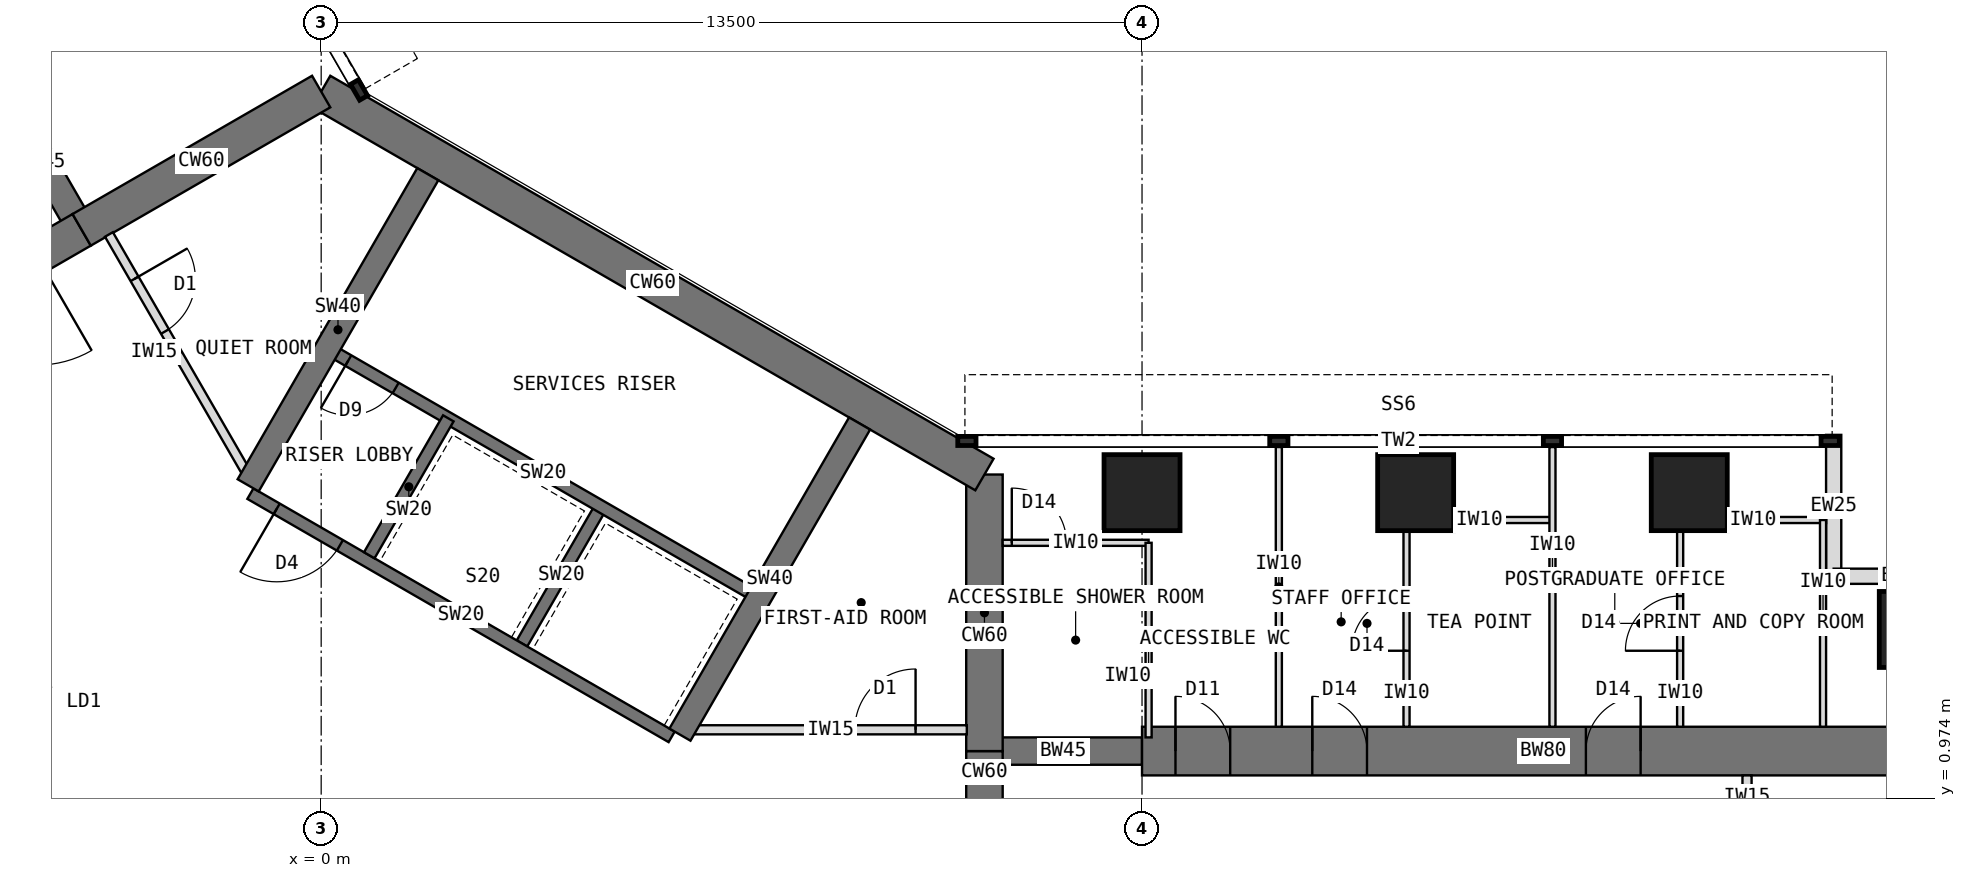
"""IFC4 building model, lengths in metres.
Left out: names, types, materials, properties, quantities, classifications, styles, units other than length and angle.
Written with IfcOpenShell. Run it as: python <this file> out.ifc"""

import sys

from ifc_helpers import new_model, si_unit, direction, frame, frame_2d, origin, origin_2d, place, context, subcontext, project, spatial, rectangle, extrude, element, fill, save


model = new_model("IFC4")
c1 = context("Model", 3, precision=1e-05, world=origin(), true_north=direction((0.0, 1.0)))
c2 = subcontext(c1, "Body", "Model", "MODEL_VIEW")
j1 = project(units=[si_unit("LENGTHUNIT", "METRE"), si_unit("PLANEANGLEUNIT", "RADIAN")], contexts=[c1])
p1 = place(None, origin())
s1 = spatial("IfcSite", under=j1, at=p1, CompositionType="ELEMENT")
p2 = place(p1, origin())
s2 = spatial("IfcBuilding", under=s1, at=p2, CompositionType="ELEMENT")
p3 = place(p2, frame((0.0, 0.0, 157.5)))
s3 = spatial("IfcBuildingStorey", under=s2, at=p3, CompositionType="ELEMENT", Elevation=157.5)
p4 = place(p3, frame((10.908, -1.75, 0.0), z_axis=(0.0, 0.0, 1.0), x_axis=(0.0, 1.0, 0.0)))
e1 = element("IfcWall", 1, at=p4, inside=s3, PredefinedType="SHEAR", context=c2, shape_type="SweptSolid", body=[
    extrude(rectangle(XDim=3.5, YDim=0.6, at=frame_2d((1.75, 0.0))), origin(), (0.0, 0.0, 1.0), 4.0),
])
p5 = place(p4, frame((0.85, 0.0, 0.0)))
e2 = element("IfcOpeningElement", 2, at=p5, cuts=e1, PredefinedType="OPENING", context=c2, shape_type="SweptSolid", body=[
    extrude(rectangle(XDim=1.8, YDim=2.1, at=frame_2d((0.9, 1.05))), frame((0.0, 0.31, 0.0), z_axis=(0.0, -1.0, 0.0), x_axis=(1.0, 0.0, 0.0)), (0.0, 0.0, 1.0), 0.62),
])
p6 = place(p3, frame((10.908, 1.75, 0.0), z_axis=(0.0, 0.0, 1.0), x_axis=(0.0, 1.0, 0.0)))
e3 = element("IfcWall", 3, at=p6, inside=s3, PredefinedType="SHEAR", context=c2, shape_type="SweptSolid", body=[
    extrude(rectangle(XDim=4.548, YDim=0.6, at=frame_2d((2.274, 0.0))), origin(), (0.0, 0.0, 1.0), 4.0),
])
p7 = place(p3, frame((10.908, 6.298, 0.0), z_axis=(0.0, 0.0, 1.0), x_axis=(-0.866021940709, 0.500005998175, 0.0)))
e4 = element("IfcWall", 4, at=p7, inside=s3, PredefinedType="SHEAR", context=c2, shape_type="SweptSolid", body=[
    extrude(rectangle(XDim=12.596, YDim=0.6, at=frame_2d((6.298, 0.0))), origin(), (0.0, 0.0, 1.0), 4.0),
])
p8 = place(p3, frame((0.0, 12.596, 0.0), z_axis=(0.0, 0.0, 1.0), x_axis=(-0.866011268655, -0.500024481964, 0.0)))
e5 = element("IfcWall", 5, at=p8, inside=s3, PredefinedType="SHEAR", context=c2, shape_type="SweptSolid", body=[
    extrude(rectangle(XDim=4.548, YDim=0.6, at=frame_2d((2.274, 0.0))), origin(), (0.0, 0.0, 1.0), 4.0),
])
p9 = place(p3, frame((-3.939, 10.322, 0.0), z_axis=(0.0, 0.0, 1.0), x_axis=(-0.866019471182, -0.500010275428, 0.0)))
e6 = element("IfcWall", 6, at=p9, inside=s3, PredefinedType="SHEAR", context=c2, shape_type="SweptSolid", body=[
    extrude(rectangle(XDim=3.5, YDim=0.6, at=frame_2d((1.75, 0.0))), origin(), (0.0, 0.0, 1.0), 4.0),
])
p10 = place(p9, frame((0.85, 0.0, 0.0)))
e7 = element("IfcOpeningElement", 7, at=p10, cuts=e6, PredefinedType="OPENING", context=c2, shape_type="SweptSolid", body=[
    extrude(rectangle(XDim=1.8, YDim=2.1, at=frame_2d((0.9, 1.05))), frame((0.0, 0.31, 0.0), z_axis=(0.0, -1.0, 0.0), x_axis=(1.0, 0.0, 0.0)), (0.0, 0.0, 1.0), 0.62),
])
p11 = place(p3, frame((10.908, 1.75, 0.0), z_axis=(0.0, 0.0, 1.0), x_axis=(1.0, 0.0, 0.0)))
e8 = element("IfcWall", 8, at=p11, inside=s3, PredefinedType="SHEAR", context=c2, shape_type="SweptSolid", body=[
    extrude(rectangle(XDim=2.592, YDim=0.45, at=frame_2d((1.296, 0.0))), origin(), (0.0, 0.0, 1.0), 4.0),
])
p12 = place(p3, frame((13.5, 1.75, 0.0), z_axis=(0.0, 0.0, 1.0), x_axis=(1.0, 0.0, 0.0)))
e9 = element("IfcWall", 9, at=p12, inside=s3, PredefinedType="SHEAR", context=c2, shape_type="SweptSolid", body=[
    extrude(rectangle(XDim=13.2, YDim=0.8, at=frame_2d((6.6, 0.0))), origin(), (0.0, 0.0, 1.0), 4.0),
])
p13 = place(p12, frame((0.55, 0.0, 0.0)))
e10 = element("IfcOpeningElement", 10, at=p13, cuts=e9, PredefinedType="OPENING", context=c2, shape_type="SweptSolid", body=[
    extrude(rectangle(XDim=0.9, YDim=2.1, at=frame_2d((0.45, 1.05))), frame((0.0, 0.41, 0.0), z_axis=(0.0, -1.0, 0.0), x_axis=(1.0, 0.0, 0.0)), (0.0, 0.0, 1.0), 0.82),
])
p14 = place(p12, frame((2.8, 0.0, 0.0)))
e11 = element("IfcOpeningElement", 11, at=p14, cuts=e9, PredefinedType="OPENING", context=c2, shape_type="SweptSolid", body=[
    extrude(rectangle(XDim=0.9, YDim=2.1, at=frame_2d((0.45, 1.05))), frame((0.0, 0.41, 0.0), z_axis=(0.0, -1.0, 0.0), x_axis=(1.0, 0.0, 0.0)), (0.0, 0.0, 1.0), 0.82),
])
p15 = place(p12, frame((7.3, 0.0, 0.0)))
e12 = element("IfcOpeningElement", 12, at=p15, cuts=e9, PredefinedType="OPENING", context=c2, shape_type="SweptSolid", body=[
    extrude(rectangle(XDim=0.9, YDim=2.1, at=frame_2d((0.45, 1.05))), frame((0.0, 0.41, 0.0), z_axis=(0.0, -1.0, 0.0), x_axis=(1.0, 0.0, 0.0)), (0.0, 0.0, 1.0), 0.82),
])
p16 = place(p3, frame((-3.939, 10.322, 0.0), z_axis=(0.0, 0.0, 1.0), x_axis=(-0.499918158782, 0.866072649678, 0.0)))
e13 = element("IfcWall", 13, at=p16, inside=s3, PredefinedType="SHEAR", context=c2, shape_type="SweptSolid", body=[
    extrude(rectangle(XDim=2.592, YDim=0.45, at=frame_2d((1.296, 0.0))), origin(), (0.0, 0.0, 1.0), 4.0),
])
for number, where, z_axis, x_axis in (
    (14, (13.5, 6.0, 0.0), (0.0, 0.0, 1.0), (1.0, 0.0, 0.0)),
    (15, (18.0, 6.0, 0.0), (0.0, 0.0, 1.0), (1.0, 0.0, 0.0)),
    (16, (22.5, 6.0, 0.0), (0.0, 0.0, 1.0), (1.0, 0.0, 0.0)),
    (17, (26.25, 3.75, 0.0), (0.0, 0.0, 1.0), (1.0, 0.0, 0.0)),
):
    element("IfcColumn", number, at=place(p3, frame(where, z_axis=z_axis, x_axis=x_axis)), inside=s3, PredefinedType="COLUMN", context=c2, shape_type="SweptSolid", body=[
        extrude(rectangle(XDim=1.25, YDim=1.25, at=origin_2d()), origin(), (0.0, 0.0, 1.0), 4.0),
    ])
for number, where, z_axis, x_axis in (
    (18, (24.875, 6.95, 0.0), (0.0, 0.0, 1.0), (0.0, -1.0, 0.0)),
    (19, (24.875, 4.625, 0.0), (0.0, 0.0, 1.0), (1.0, 0.0, 0.0)),
):
    element("IfcWall", number, at=place(p3, frame(where, z_axis=z_axis, x_axis=x_axis)), inside=s3, PredefinedType="STANDARD", context=c2, shape_type="SweptSolid", body=[
        extrude(rectangle(XDim=2.325, YDim=0.25, at=frame_2d((1.163, 0.0))), origin(), (0.0, 0.0, 1.0), 3.8),
    ])
p17 = place(p3, frame((5.764, 1.984, 0.0), z_axis=(0.0, 0.0, 1.0), x_axis=(-0.866026010844, 0.49999894854, 0.0)))
e20 = element("IfcWall", 20, at=p17, inside=s3, PredefinedType="SHEAR", context=c2, shape_type="SweptSolid", body=[
    extrude(rectangle(XDim=8.0, YDim=0.2, at=frame_2d((4.0, 0.0))), origin(), (0.0, 0.0, 1.0), 4.0),
])
p18 = place(p17, frame((6.3, 0.0, 0.0)))
e21 = element("IfcOpeningElement", 21, at=p18, cuts=e20, PredefinedType="OPENING", context=c2, shape_type="SweptSolid", body=[
    extrude(rectangle(XDim=1.2, YDim=2.1, at=frame_2d((0.6, 1.05))), frame((0.0, 0.11, 0.0), z_axis=(0.0, -1.0, 0.0), x_axis=(1.0, 0.0, 0.0)), (0.0, 0.0, 1.0), 0.22),
])
for number, where, z_axis, x_axis in (
    (22, (3.303, 3.52, 0.0), (0.0, 0.0, 1.0), (0.5, 0.866, 0.0)),
    (23, (0.791, 4.97, 0.0), (0.0, 0.0, 1.0), (0.5, 0.866, 0.0)),
):
    element("IfcWall", number, at=place(p3, frame(where, z_axis=z_axis, x_axis=x_axis)), inside=s3, PredefinedType="SHEAR", context=c2, shape_type="SweptSolid", body=[
        extrude(rectangle(XDim=2.6, YDim=0.2, at=frame_2d((1.3, 0.0))), origin(), (0.0, 0.0, 1.0), 4.0),
    ])
p19 = place(p3, frame((7.114, 4.322, 0.0), z_axis=(0.0, 0.0, 1.0), x_axis=(-0.866026010844, 0.49999894854, 0.0)))
e24 = element("IfcWall", 24, at=p19, inside=s3, PredefinedType="SHEAR", context=c2, shape_type="SweptSolid", body=[
    extrude(rectangle(XDim=8.0, YDim=0.2, at=frame_2d((4.0, 0.0))), origin(), (0.0, 0.0, 1.0), 4.0),
])
p20 = place(p19, frame((6.8, 0.0, 0.0)))
e25 = element("IfcOpeningElement", 25, at=p20, cuts=e24, PredefinedType="OPENING", context=c2, shape_type="SweptSolid", body=[
    extrude(rectangle(XDim=0.9, YDim=2.1, at=frame_2d((0.45, 1.05))), frame((0.0, 0.11, 0.0), z_axis=(0.0, -1.0, 0.0), x_axis=(1.0, 0.0, 0.0)), (0.0, 0.0, 1.0), 0.22),
])
p21 = place(p3, frame((-1.201, 6.12, 0.0), z_axis=(0.0, 0.0, 1.0), x_axis=(0.49999668571, 0.866027317282, 0.0)))
e26 = element("IfcWall", 26, at=p21, inside=s3, PredefinedType="SHEAR", context=c2, shape_type="SweptSolid", body=[
    extrude(rectangle(XDim=5.908, YDim=0.4, at=frame_2d((2.954, 0.0))), origin(), (0.0, 0.0, 1.0), 4.0),
])
p22 = place(p3, frame((5.901, 2.02, 0.0), z_axis=(0.0, 0.0, 1.0), x_axis=(0.500027676417, 0.866009424208, 0.0)))
e27 = element("IfcWall", 27, at=p22, inside=s3, PredefinedType="SHEAR", context=c2, shape_type="SweptSolid", body=[
    extrude(rectangle(XDim=5.908, YDim=0.4, at=frame_2d((2.954, 0.0))), origin(), (0.0, 0.0, 1.0), 4.0),
])
for number, where, z_axis, x_axis in (
    (28, (15.75, 2.15, 0.0), (0.0, 0.0, 1.0), (0.0, 1.0, 0.0)),
    (29, (20.25, 2.15, 0.0), (0.0, 0.0, 1.0), (0.0, 1.0, 0.0)),
):
    element("IfcWall", number, at=place(p3, frame(where, z_axis=z_axis, x_axis=x_axis)), inside=s3, PredefinedType="PARTITIONING", context=c2, shape_type="SweptSolid", body=[
        extrude(rectangle(XDim=4.6, YDim=0.1, at=frame_2d((2.3, 0.0))), origin(), (0.0, 0.0, 1.0), 3.8),
    ])
p23 = place(p3, frame((17.85, 5.55, 0.0), z_axis=(0.0, 0.0, 1.0), x_axis=(1.0, 0.0, 0.0)))
e30 = element("IfcWall", 30, at=p23, inside=s3, PredefinedType="PARTITIONING", context=c2, shape_type="SweptSolid", body=[
    extrude(rectangle(XDim=2.4, YDim=0.1, at=frame_2d((1.2, 0.0))), origin(), (0.0, 0.0, 1.0), 3.8),
])
p24 = place(p3, frame((17.85, 2.15, 0.0), z_axis=(0.0, 0.0, 1.0), x_axis=(0.0, 1.0, 0.0)))
e31 = element("IfcWall", 31, at=p24, inside=s3, PredefinedType="PARTITIONING", context=c2, shape_type="SweptSolid", body=[
    extrude(rectangle(XDim=3.4, YDim=0.1, at=frame_2d((1.7, 0.0))), origin(), (0.0, 0.0, 1.0), 3.8),
])
p25 = place(p24, frame((1.25, 0.0, 0.0)))
e32 = element("IfcOpeningElement", 32, at=p25, cuts=e31, PredefinedType="OPENING", context=c2, shape_type="SweptSolid", body=[
    extrude(rectangle(XDim=0.9, YDim=2.1, at=frame_2d((0.45, 1.05))), frame((0.0, 0.06, 0.0), z_axis=(0.0, -1.0, 0.0), x_axis=(1.0, 0.0, 0.0)), (0.0, 0.0, 1.0), 0.12),
])
p26 = place(p3, frame((22.35, 5.55, 0.0), z_axis=(0.0, 0.0, 1.0), x_axis=(1.0, 0.0, 0.0)))
e33 = element("IfcWall", 33, at=p26, inside=s3, PredefinedType="PARTITIONING", context=c2, shape_type="SweptSolid", body=[
    extrude(rectangle(XDim=2.4, YDim=0.1, at=frame_2d((1.2, 0.0))), origin(), (0.0, 0.0, 1.0), 3.8),
])
p27 = place(p3, frame((22.35, 2.15, 0.0), z_axis=(0.0, 0.0, 1.0), x_axis=(0.0, 1.0, 0.0)))
e34 = element("IfcWall", 34, at=p27, inside=s3, PredefinedType="PARTITIONING", context=c2, shape_type="SweptSolid", body=[
    extrude(rectangle(XDim=3.4, YDim=0.1, at=frame_2d((1.7, 0.0))), origin(), (0.0, 0.0, 1.0), 3.8),
])
p28 = place(p27, frame((1.25, 0.0, 0.0)))
e35 = element("IfcOpeningElement", 35, at=p28, cuts=e34, PredefinedType="OPENING", context=c2, shape_type="SweptSolid", body=[
    extrude(rectangle(XDim=0.9, YDim=2.1, at=frame_2d((0.45, 1.05))), frame((0.0, 0.06, 0.0), z_axis=(0.0, -1.0, 0.0), x_axis=(1.0, 0.0, 0.0)), (0.0, 0.0, 1.0), 0.12),
])
p29 = place(p3, frame((24.7, 2.15, 0.0), z_axis=(0.0, 0.0, 1.0), x_axis=(0.0, 1.0, 0.0)))
e36 = element("IfcWall", 36, at=p29, inside=s3, PredefinedType="PARTITIONING", context=c2, shape_type="SweptSolid", body=[
    extrude(rectangle(XDim=3.4, YDim=0.1, at=frame_2d((1.7, 0.0))), origin(), (0.0, 0.0, 1.0), 3.8),
])
p30 = place(p3, frame((11.208, 5.175, 0.0), z_axis=(0.0, 0.0, 1.0), x_axis=(1.0, 0.0, 0.0)))
e37 = element("IfcWall", 37, at=p30, inside=s3, PredefinedType="PARTITIONING", context=c2, shape_type="SweptSolid", body=[
    extrude(rectangle(XDim=2.4, YDim=0.1, at=frame_2d((1.2, 0.0))), origin(), (0.0, 0.0, 1.0), 3.8),
])
p31 = place(p30, frame((0.15, 0.0, 0.0)))
e38 = element("IfcOpeningElement", 38, at=p31, cuts=e37, PredefinedType="OPENING", context=c2, shape_type="SweptSolid", body=[
    extrude(rectangle(XDim=0.9, YDim=2.1, at=frame_2d((0.45, 1.05))), frame((0.0, 0.06, 0.0), z_axis=(0.0, -1.0, 0.0), x_axis=(1.0, 0.0, 0.0)), (0.0, 0.0, 1.0), 0.12),
])
p32 = place(p3, frame((13.608, 1.975, 0.0), z_axis=(0.0, 0.0, 1.0), x_axis=(0.0, 1.0, 0.0)))
e39 = element("IfcWall", 39, at=p32, inside=s3, PredefinedType="PARTITIONING", context=c2, shape_type="SweptSolid", body=[
    extrude(rectangle(XDim=3.2, YDim=0.1, at=frame_2d((1.6, 0.0))), origin(), (0.0, 0.0, 1.0), 3.8),
])
p33 = place(p3, frame((-3.49, 10.246, 0.0), z_axis=(0.0, 0.0, 1.0), x_axis=(0.499999473313, -0.866025707867, 0.0)))
e40 = element("IfcWall", 40, at=p33, inside=s3, PredefinedType="PARTITIONING", context=c2, shape_type="SweptSolid", body=[
    extrude(rectangle(XDim=4.476, YDim=0.15, at=frame_2d((2.238, 0.0))), origin(), (0.0, 0.0, 1.0), 3.8),
])
p34 = place(p33, frame((0.843, 0.0, 0.0)))
e41 = element("IfcOpeningElement", 41, at=p34, cuts=e40, PredefinedType="OPENING", context=c2, shape_type="SweptSolid", body=[
    extrude(rectangle(XDim=1.0, YDim=2.1, at=frame_2d((0.5, 1.05))), frame((0.0, 0.085, 0.0), z_axis=(0.0, -1.0, 0.0), x_axis=(1.0, 0.0, 0.0)), (0.0, 0.0, 1.0), 0.17),
])
p35 = place(p3, frame((6.143, 2.1, 0.0), z_axis=(0.0, 0.0, 1.0), x_axis=(1.0, 0.0, 0.0)))
e42 = element("IfcWall", 42, at=p35, inside=s3, PredefinedType="PARTITIONING", context=c2, shape_type="SweptSolid", body=[
    extrude(rectangle(XDim=4.476, YDim=0.15, at=frame_2d((2.238, 0.0))), origin(), (0.0, 0.0, 1.0), 3.8),
])
p36 = place(p35, frame((2.633, 0.0, 0.0)))
e43 = element("IfcOpeningElement", 43, at=p36, cuts=e42, PredefinedType="OPENING", context=c2, shape_type="SweptSolid", body=[
    extrude(rectangle(XDim=1.0, YDim=2.1, at=frame_2d((0.5, 1.05))), frame((0.0, 0.085, 0.0), z_axis=(0.0, -1.0, 0.0), x_axis=(1.0, 0.0, 0.0)), (0.0, 0.0, 1.0), 0.17),
])
p37 = place(p3, frame((23.45, -1.35, 0.0), z_axis=(0.0, 0.0, 1.0), x_axis=(0.0, 1.0, 0.0)))
e44 = element("IfcWall", 44, at=p37, inside=s3, PredefinedType="PARTITIONING", context=c2, shape_type="SweptSolid", body=[
    extrude(rectangle(XDim=2.7, YDim=0.15, at=frame_2d((1.35, 0.0))), origin(), (0.0, 0.0, 1.0), 3.8),
])
p38 = place(p37, frame((0.85, 0.0, 0.0)))
e45 = element("IfcOpeningElement", 45, at=p38, cuts=e44, PredefinedType="OPENING", context=c2, shape_type="SweptSolid", body=[
    extrude(rectangle(XDim=1.0, YDim=2.1, at=frame_2d((0.5, 1.05))), frame((0.0, 0.085, 0.0), z_axis=(0.0, -1.0, 0.0), x_axis=(1.0, 0.0, 0.0)), (0.0, 0.0, 1.0), 0.17),
])
p39 = place(p18, origin())
e46 = element("IfcDoor", 46, at=p39, inside=s3, OperationType="SINGLE_SWING_RIGHT", PredefinedType="DOOR", context=c2, shape_type="SweptSolid", body=[
    extrude(rectangle(XDim=1.2, YDim=2.1, at=frame_2d((0.6, 1.05))), frame((0.0, 0.025, 0.0), z_axis=(0.0, -1.0, 0.0), x_axis=(1.0, 0.0, 0.0)), (0.0, 0.0, 1.0), 0.05),
])
fill(e21, e46)
p40 = place(p20, origin())
e47 = element("IfcDoor", 47, at=p40, inside=s3, OperationType="SINGLE_SWING_RIGHT", PredefinedType="DOOR", context=c2, shape_type="SweptSolid", body=[
    extrude(rectangle(XDim=0.9, YDim=2.1, at=frame_2d((0.45, 1.05))), frame((0.0, 0.025, 0.0), z_axis=(0.0, -1.0, 0.0), x_axis=(1.0, 0.0, 0.0)), (0.0, 0.0, 1.0), 0.05),
])
fill(e25, e47)
p41 = place(p25, origin())
e48 = element("IfcDoor", 48, at=p41, inside=s3, OperationType="SINGLE_SWING_LEFT", PredefinedType="DOOR", context=c2, shape_type="SweptSolid", body=[
    extrude(rectangle(XDim=0.9, YDim=2.1, at=frame_2d((0.45, 1.05))), frame((0.0, 0.025, 0.0), z_axis=(0.0, -1.0, 0.0), x_axis=(1.0, 0.0, 0.0)), (0.0, 0.0, 1.0), 0.05),
])
fill(e32, e48)
p42 = place(p28, origin())
e49 = element("IfcDoor", 49, at=p42, inside=s3, OperationType="SINGLE_SWING_LEFT", PredefinedType="DOOR", context=c2, shape_type="SweptSolid", body=[
    extrude(rectangle(XDim=0.9, YDim=2.1, at=frame_2d((0.45, 1.05))), frame((0.0, 0.025, 0.0), z_axis=(0.0, -1.0, 0.0), x_axis=(1.0, 0.0, 0.0)), (0.0, 0.0, 1.0), 0.05),
])
fill(e35, e49)
p43 = place(p31, origin())
e50 = element("IfcDoor", 50, at=p43, inside=s3, OperationType="SINGLE_SWING_LEFT", PredefinedType="DOOR", context=c2, shape_type="SweptSolid", body=[
    extrude(rectangle(XDim=0.9, YDim=2.1, at=frame_2d((0.45, 1.05))), frame((0.0, 0.025, 0.0), z_axis=(0.0, -1.0, 0.0), x_axis=(1.0, 0.0, 0.0)), (0.0, 0.0, 1.0), 0.05),
])
fill(e38, e50)
p44 = place(p36, origin())
e51 = element("IfcDoor", 51, at=p44, inside=s3, OperationType="SINGLE_SWING_RIGHT", PredefinedType="DOOR", context=c2, shape_type="SweptSolid", body=[
    extrude(rectangle(XDim=1.0, YDim=2.1, at=frame_2d((0.5, 1.05))), frame((0.0, 0.025, 0.0), z_axis=(0.0, -1.0, 0.0), x_axis=(1.0, 0.0, 0.0)), (0.0, 0.0, 1.0), 0.05),
])
fill(e43, e51)
p45 = place(p34, origin())
e52 = element("IfcDoor", 52, at=p45, inside=s3, OperationType="SINGLE_SWING_LEFT", PredefinedType="DOOR", context=c2, shape_type="SweptSolid", body=[
    extrude(rectangle(XDim=1.0, YDim=2.1, at=frame_2d((0.5, 1.05))), frame((0.0, 0.025, 0.0), z_axis=(0.0, -1.0, 0.0), x_axis=(1.0, 0.0, 0.0)), (0.0, 0.0, 1.0), 0.05),
])
fill(e41, e52)
p46 = place(p13, origin())
e53 = element("IfcDoor", 53, at=p46, inside=s3, OperationType="SINGLE_SWING_LEFT", PredefinedType="DOOR", context=c2, shape_type="SweptSolid", body=[
    extrude(rectangle(XDim=0.82, YDim=2.06, at=frame_2d((0.45, 1.03))), frame((0.0, 0.025, 0.0), z_axis=(0.0, -1.0, 0.0), x_axis=(1.0, 0.0, 0.0)), (0.0, 0.0, 1.0), 0.05),
    extrude(rectangle(XDim=0.04, YDim=2.1, at=frame_2d((0.02, 1.05))), frame((0.0, 0.4, 0.0), z_axis=(0.0, -1.0, 0.0), x_axis=(1.0, 0.0, 0.0)), (0.0, 0.0, 1.0), 0.8),
    extrude(rectangle(XDim=0.04, YDim=2.1, at=frame_2d((0.88, 1.05))), frame((0.0, 0.4, 0.0), z_axis=(0.0, -1.0, 0.0), x_axis=(1.0, 0.0, 0.0)), (0.0, 0.0, 1.0), 0.8),
    extrude(rectangle(XDim=0.82, YDim=0.04, at=frame_2d((0.45, 2.08))), frame((0.0, 0.4, 0.0), z_axis=(0.0, -1.0, 0.0), x_axis=(1.0, 0.0, 0.0)), (0.0, 0.0, 1.0), 0.8),
])
fill(e10, e53)
p47 = place(p14, origin())
e54 = element("IfcDoor", 54, at=p47, inside=s3, OperationType="SINGLE_SWING_LEFT", PredefinedType="DOOR", context=c2, shape_type="SweptSolid", body=[
    extrude(rectangle(XDim=0.82, YDim=2.06, at=frame_2d((0.45, 1.03))), frame((0.0, 0.025, 0.0), z_axis=(0.0, -1.0, 0.0), x_axis=(1.0, 0.0, 0.0)), (0.0, 0.0, 1.0), 0.05),
    extrude(rectangle(XDim=0.04, YDim=2.1, at=frame_2d((0.02, 1.05))), frame((0.0, 0.4, 0.0), z_axis=(0.0, -1.0, 0.0), x_axis=(1.0, 0.0, 0.0)), (0.0, 0.0, 1.0), 0.8),
    extrude(rectangle(XDim=0.04, YDim=2.1, at=frame_2d((0.88, 1.05))), frame((0.0, 0.4, 0.0), z_axis=(0.0, -1.0, 0.0), x_axis=(1.0, 0.0, 0.0)), (0.0, 0.0, 1.0), 0.8),
    extrude(rectangle(XDim=0.82, YDim=0.04, at=frame_2d((0.45, 2.08))), frame((0.0, 0.4, 0.0), z_axis=(0.0, -1.0, 0.0), x_axis=(1.0, 0.0, 0.0)), (0.0, 0.0, 1.0), 0.8),
])
fill(e11, e54)
p48 = place(p15, origin())
e55 = element("IfcDoor", 55, at=p48, inside=s3, OperationType="SINGLE_SWING_RIGHT", PredefinedType="DOOR", context=c2, shape_type="SweptSolid", body=[
    extrude(rectangle(XDim=0.82, YDim=2.06, at=frame_2d((0.45, 1.03))), frame((0.0, 0.025, 0.0), z_axis=(0.0, -1.0, 0.0), x_axis=(1.0, 0.0, 0.0)), (0.0, 0.0, 1.0), 0.05),
    extrude(rectangle(XDim=0.04, YDim=2.1, at=frame_2d((0.02, 1.05))), frame((0.0, 0.4, 0.0), z_axis=(0.0, -1.0, 0.0), x_axis=(1.0, 0.0, 0.0)), (0.0, 0.0, 1.0), 0.8),
    extrude(rectangle(XDim=0.04, YDim=2.1, at=frame_2d((0.88, 1.05))), frame((0.0, 0.4, 0.0), z_axis=(0.0, -1.0, 0.0), x_axis=(1.0, 0.0, 0.0)), (0.0, 0.0, 1.0), 0.8),
    extrude(rectangle(XDim=0.82, YDim=0.04, at=frame_2d((0.45, 2.08))), frame((0.0, 0.4, 0.0), z_axis=(0.0, -1.0, 0.0), x_axis=(1.0, 0.0, 0.0)), (0.0, 0.0, 1.0), 0.8),
])
fill(e12, e55)
save(model, sys.argv[1])
